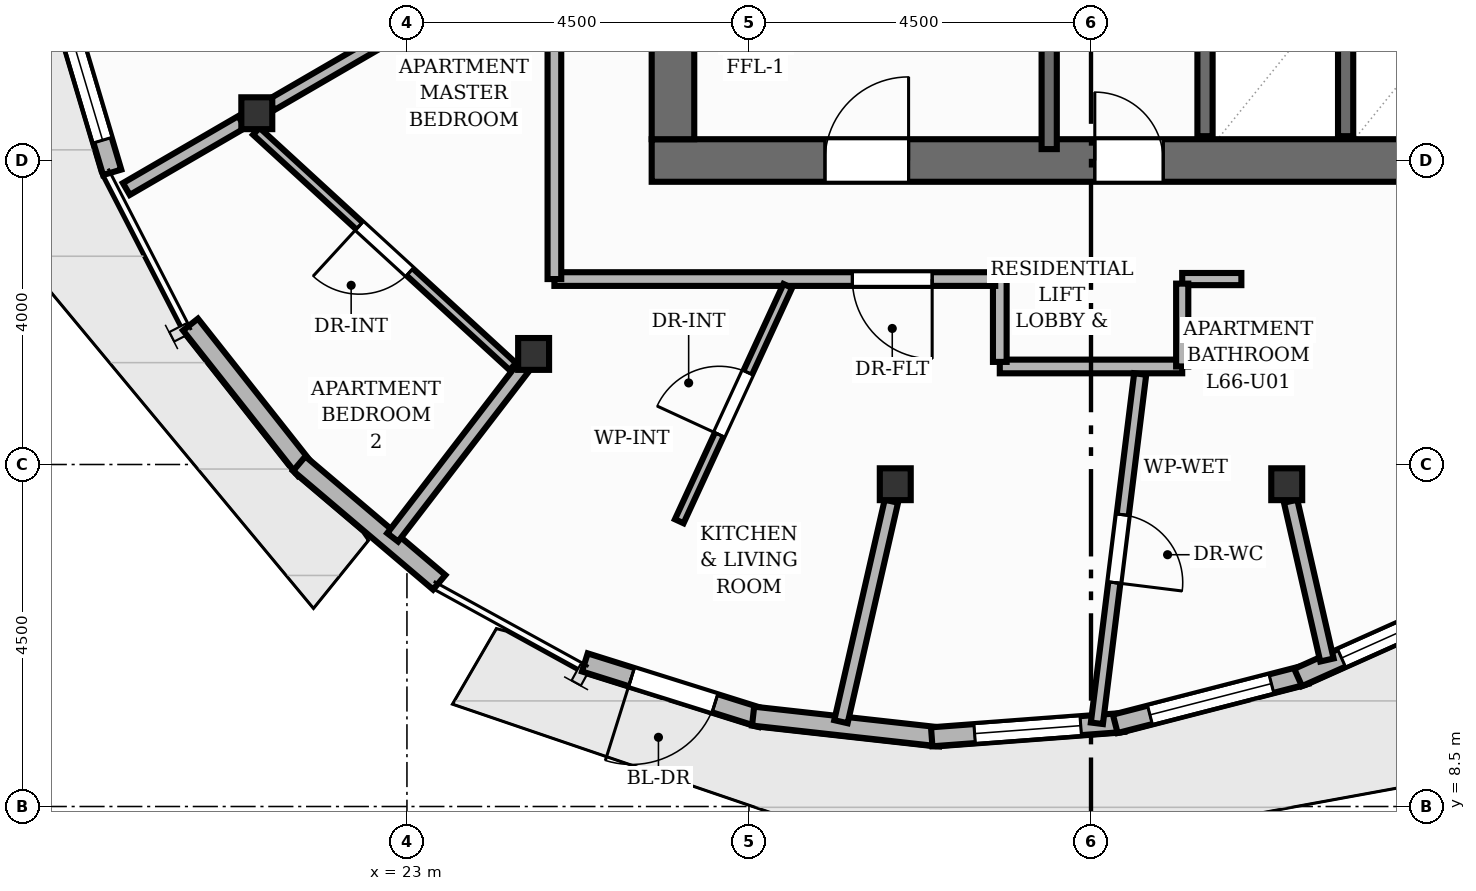
"""IFC4 building model, lengths in metres.
Left out: names, types, materials, properties, quantities, classifications, styles, units other than length and angle.
Written with IfcOpenShell. Run it as: python <this file> out.ifc"""

import sys

from ifc_helpers import new_model, si_unit, direction, frame, frame_2d, origin, origin_2d, place, context, subcontext, project, spatial, rectangle, i_section, extrude, element, fill, save


model = new_model("IFC4")
c1 = context("Model", 3, precision=1e-05, world=origin(), true_north=direction((0.0, 1.0)))
c2 = subcontext(c1, "Body", "Model", "MODEL_VIEW")
j1 = project(units=[si_unit("LENGTHUNIT", "METRE"), si_unit("PLANEANGLEUNIT", "RADIAN")], contexts=[c1])
p1 = place(None, origin())
s1 = spatial("IfcSite", under=j1, at=p1, CompositionType="ELEMENT")
p2 = place(p1, origin())
s2 = spatial("IfcBuilding", under=s1, at=p2, CompositionType="ELEMENT")
p3 = place(p2, frame((0.0, 0.0, 220.64)))
s3 = spatial("IfcBuildingStorey", under=s2, at=p3, CompositionType="ELEMENT", Elevation=220.64)
p4 = place(p3, frame((26.22, 17.0, 0.0), z_axis=(0.0, 0.0, 1.0), x_axis=(1.0, 0.0, 0.0)))
e1 = element("IfcWall", 1, at=p4, inside=s3, PredefinedType="SHEAR", context=c2, shape_type="SweptSolid", body=[
    extrude(rectangle(XDim=11.56, YDim=0.56, at=frame_2d((5.78, 0.0))), origin(), (0.0, 0.0, 1.0), 3.2),
])
p5 = place(p4, frame((2.28, 0.0, 0.0)))
e2 = element("IfcOpeningElement", 2, at=p5, cuts=e1, PredefinedType="OPENING", context=c2, shape_type="SweptSolid", body=[
    extrude(rectangle(XDim=1.1, YDim=2.15, at=frame_2d((0.55, 1.075))), frame((0.0, 0.29, 0.0), z_axis=(0.0, -1.0, 0.0), x_axis=(1.0, 0.0, 0.0)), (0.0, 0.0, 1.0), 0.58),
])
p6 = place(p4, frame((5.83, 0.0, 0.0)))
e3 = element("IfcOpeningElement", 3, at=p6, cuts=e1, PredefinedType="OPENING", context=c2, shape_type="SweptSolid", body=[
    extrude(rectangle(XDim=0.9, YDim=2.1, at=frame_2d((0.45, 1.05))), frame((0.0, 0.29, 0.0), z_axis=(0.0, -1.0, 0.0), x_axis=(1.0, 0.0, 0.0)), (0.0, 0.0, 1.0), 0.58),
])
p7 = place(p3, frame((26.5, 17.28, 0.0), z_axis=(0.0, 0.0, 1.0), x_axis=(0.0, 1.0, 0.0)))
e4 = element("IfcWall", 4, at=p7, inside=s3, PredefinedType="SHEAR", context=c2, shape_type="SweptSolid", body=[
    extrude(rectangle(XDim=13.44, YDim=0.56, at=frame_2d((6.72, 0.0))), origin(), (0.0, 0.0, 1.0), 3.2),
])
for number, where, z_axis, x_axis in (
    (5, (21.025, 17.622, 0.0), (0.0, 0.0, 1.0), (1.0, 0.0, 0.0)),
    (6, (24.667, 14.455, 0.0), (0.0, 0.0, 1.0), (1.0, 0.0, 0.0)),
    (7, (29.425, 12.74, 0.0), (0.0, 0.0, 1.0), (1.0, 0.0, 0.0)),
    (8, (34.575, 12.74, 0.0), (0.0, 0.0, 1.0), (1.0, 0.0, 0.0)),
):
    element("IfcColumn", number, at=place(p3, frame(where, z_axis=z_axis, x_axis=x_axis)), inside=s3, PredefinedType="COLUMN", context=c2, shape_type="SweptSolid", body=[
        extrude(i_section(OverallWidth=0.407, OverallDepth=0.419, WebThickness=0.031, FlangeThickness=0.049, at=origin_2d()), origin(), (0.0, 0.0, 1.0), 3.2),
    ])
p8 = place(p3, frame((19.122, 16.844, 0.0), z_axis=(0.0, 0.0, 1.0), x_axis=(-0.285604720301, 0.958347506775, 0.0)))
e9 = element("IfcWall", 9, at=p8, inside=s3, PredefinedType="SOLIDWALL", context=c2, shape_type="SweptSolid", body=[
    extrude(rectangle(XDim=2.532, YDim=0.25, at=frame_2d((1.266, 0.0))), origin(), (0.0, 0.0, 1.0), 2.96),
])
p9 = place(p8, frame((0.441, 0.0, 0.85)))
e10 = element("IfcOpeningElement", 10, at=p9, cuts=e9, PredefinedType="OPENING", context=c2, shape_type="SweptSolid", body=[
    extrude(rectangle(XDim=1.65, YDim=1.55, at=frame_2d((0.825, 0.775))), frame((0.0, 0.135, 0.0), z_axis=(0.0, -1.0, 0.0), x_axis=(1.0, 0.0, 0.0)), (0.0, 0.0, 1.0), 0.27),
])
p10 = place(p3, frame((21.663, 12.929, 0.0), z_axis=(0.0, 0.0, 1.0), x_axis=(-0.619881401672, 0.784695512833, 0.0)))
e11 = element("IfcWall", 11, at=p10, inside=s3, PredefinedType="SOLIDWALL", context=c2, shape_type="SweptSolid", body=[
    extrude(rectangle(XDim=2.437, YDim=0.25, at=frame_2d((1.218, 0.0))), origin(), (0.0, 0.0, 1.0), 2.96),
])
p11 = place(p3, frame((23.425, 11.45, 0.0), z_axis=(0.0, 0.0, 1.0), x_axis=(-0.762614923672, 0.646852748462, 0.0)))
e12 = element("IfcWall", 12, at=p11, inside=s3, PredefinedType="SOLIDWALL", context=c2, shape_type="SweptSolid", body=[
    extrude(rectangle(XDim=2.415, YDim=0.25, at=frame_2d((1.208, 0.0))), origin(), (0.0, 0.0, 1.0), 2.96),
])
p12 = place(p3, frame((27.666, 9.666, 0.0), z_axis=(0.0, 0.0, 1.0), x_axis=(-0.95407801166, 0.299558254212, 0.0)))
e13 = element("IfcWall", 13, at=p12, inside=s3, PredefinedType="SOLIDWALL", context=c2, shape_type="SweptSolid", body=[
    extrude(rectangle(XDim=2.437, YDim=0.25, at=frame_2d((1.218, 0.0))), origin(), (0.0, 0.0, 1.0), 2.96),
])
p13 = place(p12, frame((0.643, 0.0, 0.0)))
e14 = element("IfcOpeningElement", 14, at=p13, cuts=e13, PredefinedType="OPENING", context=c2, shape_type="SweptSolid", body=[
    extrude(rectangle(XDim=1.15, YDim=2.2, at=frame_2d((0.575, 1.1))), frame((0.0, 0.135, 0.0), z_axis=(0.0, -1.0, 0.0), x_axis=(1.0, 0.0, 0.0)), (0.0, 0.0, 1.0), 0.27),
])
p14 = place(p3, frame((30.017, 9.415, 0.0), z_axis=(0.0, 0.0, 1.0), x_axis=(-0.993859679734, 0.110647806121, 0.0)))
e15 = element("IfcWall", 15, at=p14, inside=s3, PredefinedType="SOLIDWALL", context=c2, shape_type="SweptSolid", body=[
    extrude(rectangle(XDim=2.478, YDim=0.25, at=frame_2d((1.239, 0.0))), origin(), (0.0, 0.0, 1.0), 2.96),
])
p15 = place(p3, frame((32.429, 9.606, 0.0), z_axis=(0.0, 0.0, 1.0), x_axis=(-0.997203982256, -0.074727623888, 0.0)))
e16 = element("IfcWall", 16, at=p15, inside=s3, PredefinedType="SOLIDWALL", context=c2, shape_type="SweptSolid", body=[
    extrude(rectangle(XDim=2.532, YDim=0.25, at=frame_2d((1.266, 0.0))), origin(), (0.0, 0.0, 1.0), 2.96),
])
p16 = place(p15, frame((0.566, 0.0, 0.85)))
e17 = element("IfcOpeningElement", 17, at=p16, cuts=e16, PredefinedType="OPENING", context=c2, shape_type="SweptSolid", body=[
    extrude(rectangle(XDim=1.4, YDim=1.55, at=frame_2d((0.7, 0.775))), frame((0.0, 0.135, 0.0), z_axis=(0.0, -1.0, 0.0), x_axis=(1.0, 0.0, 0.0)), (0.0, 0.0, 1.0), 0.27),
])
p17 = place(p3, frame((34.829, 10.234, 0.0), z_axis=(0.0, 0.0, 1.0), x_axis=(-0.968423445169, -0.249311112562, 0.0)))
e18 = element("IfcWall", 18, at=p17, inside=s3, PredefinedType="SOLIDWALL", context=c2, shape_type="SweptSolid", body=[
    extrude(rectangle(XDim=2.592, YDim=0.25, at=frame_2d((1.296, 0.0))), origin(), (0.0, 0.0, 1.0), 2.96),
])
p18 = place(p17, frame((0.471, 0.0, 0.85)))
e19 = element("IfcOpeningElement", 19, at=p18, cuts=e18, PredefinedType="OPENING", context=c2, shape_type="SweptSolid", body=[
    extrude(rectangle(XDim=1.65, YDim=1.55, at=frame_2d((0.825, 0.775))), frame((0.0, 0.135, 0.0), z_axis=(0.0, -1.0, 0.0), x_axis=(1.0, 0.0, 0.0)), (0.0, 0.0, 1.0), 0.27),
])
p19 = place(p3, frame((37.145, 11.281, 0.0), z_axis=(0.0, 0.0, 1.0), x_axis=(-0.912779399898, -0.408452894617, 0.0)))
e20 = element("IfcWall", 20, at=p19, inside=s3, PredefinedType="SOLIDWALL", context=c2, shape_type="SweptSolid", body=[
    extrude(rectangle(XDim=2.651, YDim=0.25, at=frame_2d((1.325, 0.0))), origin(), (0.0, 0.0, 1.0), 2.96),
])
p20 = place(p19, frame((0.625, 0.0, 0.85)))
e21 = element("IfcOpeningElement", 21, at=p20, cuts=e20, PredefinedType="OPENING", context=c2, shape_type="SweptSolid", body=[
    extrude(rectangle(XDim=1.4, YDim=1.52, at=frame_2d((0.7, 0.76))), frame((0.0, 0.135, 0.0), z_axis=(0.0, -1.0, 0.0), x_axis=(1.0, 0.0, 0.0)), (0.0, 0.0, 1.0), 0.27),
])
p21 = place(p3, frame((31.45, 17.15, 0.0), z_axis=(0.0, 0.0, 1.0), x_axis=(0.0, 1.0, 0.0)))
e22 = element("IfcWall", 22, at=p21, inside=s3, PredefinedType="SHEAR", context=c2, shape_type="SweptSolid", body=[
    extrude(rectangle(XDim=3.5, YDim=0.2, at=frame_2d((1.75, 0.0))), origin(), (0.0, 0.0, 1.0), 3.2),
])
for number, where, z_axis, x_axis in (
    (23, (33.5, 17.32, 0.0), (0.0, 0.0, 1.0), (0.0, 1.0, 0.0)),
    (24, (35.35, 17.32, 0.0), (0.0, 0.0, 1.0), (0.0, 1.0, 0.0)),
):
    element("IfcWall", number, at=place(p3, frame(where, z_axis=z_axis, x_axis=x_axis)), inside=s3, PredefinedType="SHEAR", context=c2, shape_type="SweptSolid", body=[
        extrude(rectangle(XDim=1.86, YDim=0.2, at=frame_2d((0.93, 0.0))), origin(), (0.0, 0.0, 1.0), 3.2),
    ])
p22 = place(p3, frame((20.826, 17.507, 0.0), z_axis=(0.0, 0.0, 1.0), x_axis=(-0.864599922959, -0.502460917106, 0.0)))
e25 = element("IfcWall", 25, at=p22, inside=s3, PredefinedType="PARTITIONING", context=c2, shape_type="SweptSolid", body=[
    extrude(rectangle(XDim=1.756, YDim=0.18, at=frame_2d((0.878, 0.0))), origin(), (0.0, 0.0, 1.0), 2.404),
])
p23 = place(p3, frame((24.527, 14.273, 0.0), z_axis=(0.0, 0.0, 1.0), x_axis=(-0.609232660573, -0.792991529142, 0.0)))
e26 = element("IfcWall", 26, at=p23, inside=s3, PredefinedType="PARTITIONING", context=c2, shape_type="SweptSolid", body=[
    extrude(rectangle(XDim=2.814, YDim=0.18, at=frame_2d((1.407, 0.0))), origin(), (0.0, 0.0, 1.0), 2.404),
])
p24 = place(p3, frame((29.374, 12.517, 0.0), z_axis=(0.0, 0.0, 1.0), x_axis=(-0.22291168124, -0.974838644272, 0.0)))
e27 = element("IfcWall", 27, at=p24, inside=s3, PredefinedType="PARTITIONING", context=c2, shape_type="SweptSolid", body=[
    extrude(rectangle(XDim=2.976, YDim=0.18, at=frame_2d((1.488, 0.0))), origin(), (0.0, 0.0, 1.0), 2.404),
])
p25 = place(p3, frame((34.626, 12.517, 0.0), z_axis=(0.0, 0.0, 1.0), x_axis=(0.222945438732, -0.974830924493, 0.0)))
e28 = element("IfcWall", 28, at=p25, inside=s3, PredefinedType="PARTITIONING", context=c2, shape_type="SweptSolid", body=[
    extrude(rectangle(XDim=2.143, YDim=0.18, at=frame_2d((1.072, 0.0))), origin(), (0.0, 0.0, 1.0), 2.404),
])
p26 = place(p3, frame((33.2, 14.29, 0.0), z_axis=(0.0, 0.0, 1.0), x_axis=(-1.0, 0.0, 0.0)))
e29 = element("IfcWall", 29, at=p26, inside=s3, PredefinedType="PARTITIONING", context=c2, shape_type="SweptSolid", body=[
    extrude(rectangle(XDim=2.4, YDim=0.18, at=frame_2d((1.2, 0.0))), origin(), (0.0, 0.0, 1.0), 2.955),
])
p27 = place(p3, frame((30.8, 14.35, 0.0), z_axis=(0.0, 0.0, 1.0), x_axis=(0.0, 1.0, 0.0)))
e30 = element("IfcWall", 30, at=p27, inside=s3, PredefinedType="PARTITIONING", context=c2, shape_type="SweptSolid", body=[
    extrude(rectangle(XDim=1.09, YDim=0.18, at=frame_2d((0.545, 0.0))), origin(), (0.0, 0.0, 1.0), 2.955),
])
p28 = place(p3, frame((30.74, 15.44, 0.0), z_axis=(0.0, 0.0, 1.0), x_axis=(-1.0, 0.0, 0.0)))
e31 = element("IfcWall", 31, at=p28, inside=s3, PredefinedType="PARTITIONING", context=c2, shape_type="SweptSolid", body=[
    extrude(rectangle(XDim=5.8, YDim=0.18, at=frame_2d((2.9, 0.0))), origin(), (0.0, 0.0, 1.0), 2.955),
])
p29 = place(p28, frame((0.83, 0.0, 0.0)))
e32 = element("IfcOpeningElement", 32, at=p29, cuts=e31, PredefinedType="OPENING", context=c2, shape_type="SweptSolid", body=[
    extrude(rectangle(XDim=1.05, YDim=2.15, at=frame_2d((0.525, 1.075))), frame((0.0, 0.1, 0.0), z_axis=(0.0, -1.0, 0.0), x_axis=(1.0, 0.0, 0.0)), (0.0, 0.0, 1.0), 0.2),
])
p30 = place(p3, frame((33.978, 15.44, 0.0), z_axis=(0.0, 0.0, 1.0), x_axis=(-1.0, 0.0, 0.0)))
e33 = element("IfcWall", 33, at=p30, inside=s3, PredefinedType="PLUMBINGWALL", context=c2, shape_type="SweptSolid", body=[
    extrude(rectangle(XDim=0.778, YDim=0.16, at=frame_2d((0.389, 0.0))), origin(), (0.0, 0.0, 1.0), 2.955),
])
p31 = place(p3, frame((33.2, 15.38, 0.0), z_axis=(0.0, 0.0, 1.0), x_axis=(0.0, -1.0, 0.0)))
e34 = element("IfcWall", 34, at=p31, inside=s3, PredefinedType="PLUMBINGWALL", context=c2, shape_type="SweptSolid", body=[
    extrude(rectangle(XDim=1.09, YDim=0.16, at=frame_2d((0.545, 0.0))), origin(), (0.0, 0.0, 1.0), 2.955),
])
p32 = place(p3, frame((24.94, 15.44, 0.0), z_axis=(0.0, 0.0, 1.0), x_axis=(0.0, 1.0, 0.0)))
e35 = element("IfcWall", 35, at=p32, inside=s3, PredefinedType="PARTITIONING", context=c2, shape_type="SweptSolid", body=[
    extrude(rectangle(XDim=7.982, YDim=0.18, at=frame_2d((3.991, 0.0))), origin(), (0.0, 0.0, 1.0), 2.955),
])
p33 = place(p3, frame((32.647, 14.191, 0.0), z_axis=(0.0, 0.0, 1.0), x_axis=(-0.123041966912, -0.992401468348, 0.0)))
e36 = element("IfcWall", 36, at=p33, inside=s3, PredefinedType="PLUMBINGWALL", context=c2, shape_type="SweptSolid", body=[
    extrude(rectangle(XDim=4.631, YDim=0.16, at=frame_2d((2.315, 0.0))), origin(), (0.0, 0.0, 1.0), 2.692),
])
p34 = place(p33, frame((1.865, 0.0, 0.0)))
e37 = element("IfcOpeningElement", 37, at=p34, cuts=e36, PredefinedType="OPENING", context=c2, shape_type="SweptSolid", body=[
    extrude(rectangle(XDim=0.9, YDim=2.1, at=frame_2d((0.45, 1.05))), frame((0.0, 0.09, 0.0), z_axis=(0.0, -1.0, 0.0), x_axis=(1.0, 0.0, 0.0)), (0.0, 0.0, 1.0), 0.18),
])
p35 = place(p3, frame((26.583, 12.253, 0.0), z_axis=(0.0, 0.0, 1.0), x_axis=(0.41880384085, 0.908076727424, 0.0)))
e38 = element("IfcWall", 38, at=p35, inside=s3, PredefinedType="PARTITIONING", context=c2, shape_type="SweptSolid", body=[
    extrude(rectangle(XDim=3.409, YDim=0.125, at=frame_2d((1.705, 0.0))), origin(), (0.0, 0.0, 1.0), 2.955),
])
p36 = place(p35, frame((1.255, 0.0, 0.0)))
e39 = element("IfcOpeningElement", 39, at=p36, cuts=e38, PredefinedType="OPENING", context=c2, shape_type="SweptSolid", body=[
    extrude(rectangle(XDim=0.9, YDim=2.1, at=frame_2d((0.45, 1.05))), frame((0.0, 0.073, 0.0), z_axis=(0.0, -1.0, 0.0), x_axis=(1.0, 0.0, 0.0)), (0.0, 0.0, 1.0), 0.145),
])
p37 = place(p3, frame((24.393, 14.288, 0.0), z_axis=(0.0, 0.0, 1.0), x_axis=(-0.736828890574, 0.676079274949, 0.0)))
e40 = element("IfcWall", 40, at=p37, inside=s3, PredefinedType="PARTITIONING", context=c2, shape_type="SweptSolid", body=[
    extrude(rectangle(XDim=4.582, YDim=0.125, at=frame_2d((2.291, 0.0))), origin(), (0.0, 0.0, 1.0), 2.488),
])
p38 = place(p37, frame((1.841, 0.0, 0.0)))
e41 = element("IfcOpeningElement", 41, at=p38, cuts=e40, PredefinedType="OPENING", context=c2, shape_type="SweptSolid", body=[
    extrude(rectangle(XDim=0.9, YDim=2.1, at=frame_2d((0.45, 1.05))), frame((0.0, 0.073, 0.0), z_axis=(0.0, -1.0, 0.0), x_axis=(1.0, 0.0, 0.0)), (0.0, 0.0, 1.0), 0.145),
])
p39 = place(p3, frame((21.218, 17.734, 0.0), z_axis=(0.0, 0.0, 1.0), x_axis=(0.864618907014, 0.502428249239, 0.0)))
e42 = element("IfcWall", 42, at=p39, inside=s3, PredefinedType="PLUMBINGWALL", context=c2, shape_type="SweptSolid", body=[
    extrude(rectangle(XDim=4.305, YDim=0.16, at=frame_2d((2.153, 0.0))), origin(), (0.0, 0.0, 1.0), 2.404),
])
p40 = place(p13, origin())
e43 = element("IfcDoor", 43, at=p40, inside=s3, OperationType="SINGLE_SWING_RIGHT", PredefinedType="DOOR", context=c2, shape_type="SweptSolid", body=[
    extrude(rectangle(XDim=1.15, YDim=2.2, at=frame_2d((0.575, 1.1))), frame((0.0, 0.025, 0.0), z_axis=(0.0, -1.0, 0.0), x_axis=(1.0, 0.0, 0.0)), (0.0, 0.0, 1.0), 0.05),
])
fill(e14, e43)
p41 = place(p9, origin())
e44 = element("IfcWindow", 44, at=p41, inside=s3, PartitioningType="SINGLE_PANEL", PredefinedType="WINDOW", context=c2, shape_type="SweptSolid", body=[
    extrude(rectangle(XDim=1.65, YDim=1.55, at=frame_2d((0.825, 0.775))), frame((0.0, 0.03, 0.0), z_axis=(0.0, -1.0, 0.0), x_axis=(1.0, 0.0, 0.0)), (0.0, 0.0, 1.0), 0.06),
])
fill(e10, e44)
p42 = place(p16, origin())
e45 = element("IfcWindow", 45, at=p42, inside=s3, PartitioningType="SINGLE_PANEL", PredefinedType="WINDOW", context=c2, shape_type="SweptSolid", body=[
    extrude(rectangle(XDim=1.4, YDim=1.55, at=frame_2d((0.7, 0.775))), frame((0.0, 0.03, 0.0), z_axis=(0.0, -1.0, 0.0), x_axis=(1.0, 0.0, 0.0)), (0.0, 0.0, 1.0), 0.06),
])
fill(e17, e45)
p43 = place(p18, origin())
e46 = element("IfcWindow", 46, at=p43, inside=s3, PartitioningType="SINGLE_PANEL", PredefinedType="WINDOW", context=c2, shape_type="SweptSolid", body=[
    extrude(rectangle(XDim=1.65, YDim=1.55, at=frame_2d((0.825, 0.775))), frame((0.0, 0.03, 0.0), z_axis=(0.0, -1.0, 0.0), x_axis=(1.0, 0.0, 0.0)), (0.0, 0.0, 1.0), 0.06),
])
fill(e19, e46)
p44 = place(p20, origin())
e47 = element("IfcWindow", 47, at=p44, inside=s3, PartitioningType="SINGLE_PANEL", PredefinedType="WINDOW", context=c2, shape_type="SweptSolid", body=[
    extrude(rectangle(XDim=1.4, YDim=1.52, at=frame_2d((0.7, 0.76))), frame((0.0, 0.03, 0.0), z_axis=(0.0, -1.0, 0.0), x_axis=(1.0, 0.0, 0.0)), (0.0, 0.0, 1.0), 0.06),
])
fill(e21, e47)
p45 = place(p5, origin())
e48 = element("IfcDoor", 48, at=p45, inside=s3, OperationType="SINGLE_SWING_RIGHT", PredefinedType="DOOR", context=c2, shape_type="SweptSolid", body=[
    extrude(rectangle(XDim=1.1, YDim=2.15, at=frame_2d((0.55, 1.075))), frame((0.0, 0.025, 0.0), z_axis=(0.0, -1.0, 0.0), x_axis=(1.0, 0.0, 0.0)), (0.0, 0.0, 1.0), 0.05),
])
fill(e2, e48)
p46 = place(p6, origin())
e49 = element("IfcDoor", 49, at=p46, inside=s3, OperationType="SINGLE_SWING_LEFT", PredefinedType="DOOR", context=c2, shape_type="SweptSolid", body=[
    extrude(rectangle(XDim=0.9, YDim=2.1, at=frame_2d((0.45, 1.05))), frame((0.0, 0.025, 0.0), z_axis=(0.0, -1.0, 0.0), x_axis=(1.0, 0.0, 0.0)), (0.0, 0.0, 1.0), 0.05),
])
fill(e3, e49)
p47 = place(p29, origin())
e50 = element("IfcDoor", 50, at=p47, inside=s3, OperationType="SINGLE_SWING_LEFT", PredefinedType="DOOR", context=c2, shape_type="SweptSolid", body=[
    extrude(rectangle(XDim=1.05, YDim=2.15, at=frame_2d((0.525, 1.075))), frame((0.0, 0.025, 0.0), z_axis=(0.0, -1.0, 0.0), x_axis=(1.0, 0.0, 0.0)), (0.0, 0.0, 1.0), 0.05),
])
fill(e32, e50)
p48 = place(p34, origin())
e51 = element("IfcDoor", 51, at=p48, inside=s3, OperationType="SINGLE_SWING_RIGHT", PredefinedType="DOOR", context=c2, shape_type="SweptSolid", body=[
    extrude(rectangle(XDim=0.9, YDim=2.1, at=frame_2d((0.45, 1.05))), frame((0.0, 0.025, 0.0), z_axis=(0.0, -1.0, 0.0), x_axis=(1.0, 0.0, 0.0)), (0.0, 0.0, 1.0), 0.05),
])
fill(e37, e51)
p49 = place(p36, origin())
e52 = element("IfcDoor", 52, at=p49, inside=s3, OperationType="SINGLE_SWING_LEFT", PredefinedType="DOOR", context=c2, shape_type="SweptSolid", body=[
    extrude(rectangle(XDim=0.9, YDim=2.1, at=frame_2d((0.45, 1.05))), frame((0.0, 0.025, 0.0), z_axis=(0.0, -1.0, 0.0), x_axis=(1.0, 0.0, 0.0)), (0.0, 0.0, 1.0), 0.05),
])
fill(e39, e52)
p50 = place(p38, origin())
e53 = element("IfcDoor", 53, at=p50, inside=s3, OperationType="SINGLE_SWING_RIGHT", PredefinedType="DOOR", context=c2, shape_type="SweptSolid", body=[
    extrude(rectangle(XDim=0.9, YDim=2.1, at=frame_2d((0.45, 1.05))), frame((0.0, 0.025, 0.0), z_axis=(0.0, -1.0, 0.0), x_axis=(1.0, 0.0, 0.0)), (0.0, 0.0, 1.0), 0.05),
])
fill(e41, e53)
save(model, sys.argv[1])
